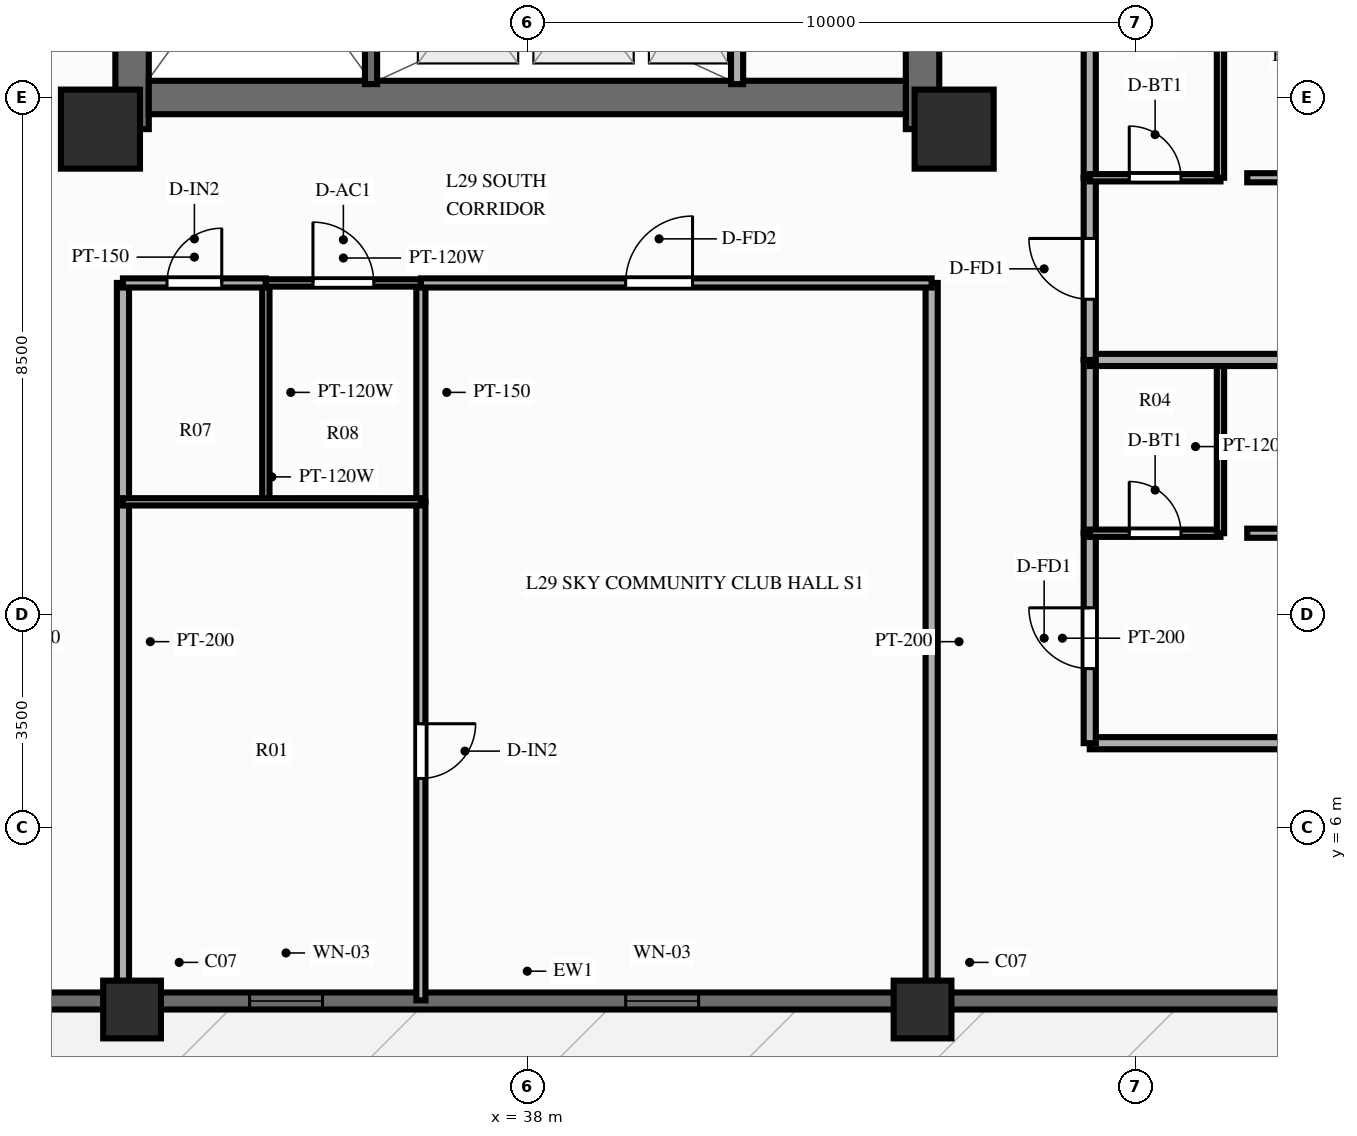
"""IFC4 building model, lengths in metres.
Left out: names, types, materials, properties, quantities, classifications, styles, units other than length and angle.
Written with IfcOpenShell. Run it as: python <this file> out.ifc"""

import sys

from ifc_helpers import new_model, si_unit, direction, frame, frame_2d, origin, origin_2d, place, context, subcontext, project, spatial, rectangle, extrude, source, transform, mapped, element, fill, save


model = new_model("IFC4")
c1 = context("Model", 3, precision=1e-05, world=origin(), true_north=direction((0.0, 1.0)))
c2 = subcontext(c1, "Body", "Model", "MODEL_VIEW")
j1 = project(units=[si_unit("LENGTHUNIT", "METRE"), si_unit("PLANEANGLEUNIT", "RADIAN")], contexts=[c1])
p1 = place(None, origin())
s1 = spatial("IfcSite", under=j1, at=p1, CompositionType="ELEMENT")
p2 = place(p1, origin())
s2 = spatial("IfcBuilding", under=s1, at=p2, CompositionType="ELEMENT")
p3 = place(p2, frame((0.0, 0.0, 92.85)))
s3 = spatial("IfcBuildingStorey", under=s2, at=p3, CompositionType="ELEMENT", Elevation=92.85)
p4 = place(p3, frame((31.5, 17.48, 0.0), z_axis=(0.0, 0.0, 1.0), x_axis=(0.0, 1.0, 0.0)))
e1 = element("IfcWall", 1, at=p4, inside=s3, PredefinedType="SHEAR", context=c2, shape_type="SweptSolid", body=[
    extrude(rectangle(XDim=19.04, YDim=0.55, at=frame_2d((9.52, 0.0))), origin(), (0.0, 0.0, 1.0), 3.0),
])
p5 = place(p4, frame((6.32, 0.0, 0.0)))
e2 = element("IfcOpeningElement", 2, at=p5, cuts=e1, PredefinedType="OPENING", context=c2, shape_type="SweptSolid", body=[
    extrude(rectangle(XDim=1.1, YDim=2.15, at=frame_2d((0.55, 1.075))), frame((0.0, 0.287, 0.0), z_axis=(0.0, -1.0, 0.0), x_axis=(1.0, 0.0, 0.0)), (0.0, 0.0, 1.0), 0.574),
])
p6 = place(p3, frame((44.5, 17.48, 0.0), z_axis=(0.0, 0.0, 1.0), x_axis=(0.0, 1.0, 0.0)))
e3 = element("IfcWall", 3, at=p6, inside=s3, PredefinedType="SHEAR", context=c2, shape_type="SweptSolid", body=[
    extrude(rectangle(XDim=19.04, YDim=0.55, at=frame_2d((9.52, 0.0))), origin(), (0.0, 0.0, 1.0), 3.0),
])
p7 = place(p6, frame((12.67, 0.0, 0.0), z_axis=(0.0, 0.0, 1.0), x_axis=(-1.0, 0.0, 0.0)))
e4 = element("IfcOpeningElement", 4, at=p7, cuts=e3, PredefinedType="OPENING", context=c2, shape_type="SweptSolid", body=[
    extrude(rectangle(XDim=1.1, YDim=2.15, at=frame_2d((0.55, 1.075))), frame((0.0, 0.287, 0.0), z_axis=(0.0, -1.0, 0.0), x_axis=(1.0, 0.0, 0.0)), (0.0, 0.0, 1.0), 0.574),
])
p8 = place(p3, frame((31.775, 18.0, 0.0), z_axis=(0.0, 0.0, 1.0), x_axis=(1.0, 0.0, 0.0)))
e5 = element("IfcWall", 5, at=p8, inside=s3, PredefinedType="SHEAR", context=c2, shape_type="SweptSolid", body=[
    extrude(rectangle(XDim=12.45, YDim=0.55, at=frame_2d((6.225, 0.0))), origin(), (0.0, 0.0, 1.0), 3.0),
])
m1 = source(origin(), c2, "Body", "SweptSolid", [
    extrude(rectangle(XDim=1.3, YDim=1.3, at=origin_2d()), origin(), (0.0, 0.0, 1.0), 3.0),
])
for number, where, z_axis, x_axis in (
    (6, (30.98, 17.48, 0.0), (0.0, 0.0, 1.0), (1.0, 0.0, 0.0)),
    (7, (45.02, 17.48, 0.0), (0.0, 0.0, 1.0), (1.0, 0.0, 0.0)),
):
    element("IfcColumn", number, at=place(p3, frame(where, z_axis=z_axis, x_axis=x_axis)), inside=s3, PredefinedType="COLUMN", context=c2, shape_type="MappedRepresentation", body=[
        mapped(m1, transform((0.0, 0.0, 0.0), scale=1.0)),
    ])
m2 = source(origin(), c2, "Body", "SweptSolid", [
    extrude(rectangle(XDim=0.95, YDim=0.95, at=origin_2d()), origin(), (0.0, 0.0, 1.0), 3.0),
])
for number, where, z_axis, x_axis in (
    (8, (31.5, 3.0, 0.0), (0.0, 0.0, 1.0), (1.0, 0.0, 0.0)),
    (9, (44.5, 3.0, 0.0), (0.0, 0.0, 1.0), (1.0, 0.0, 0.0)),
):
    element("IfcColumn", number, at=place(p3, frame(where, z_axis=z_axis, x_axis=x_axis)), inside=s3, PredefinedType="COLUMN", context=c2, shape_type="MappedRepresentation", body=[
        mapped(m2, transform((0.0, 0.0, 0.0), scale=1.0)),
    ])
p9 = place(p3, frame((16.2, 3.14, 0.0), z_axis=(0.0, 0.0, 1.0), x_axis=(1.0, 0.0, 0.0)))
e10 = element("IfcWall", 10, at=p9, inside=s3, PredefinedType="SOLIDWALL", context=c2, shape_type="SweptSolid", body=[
    extrude(rectangle(XDim=43.6, YDim=0.28, at=frame_2d((21.8, 0.0))), origin(), (0.0, 0.0, 1.0), 2.28),
])
p10 = place(p9, frame((8.2, 0.0, 0.0), z_axis=(0.0, 0.0, 1.0), x_axis=(-1.0, 0.0, 0.0)))
e11 = element("IfcOpeningElement", 11, at=p10, cuts=e10, PredefinedType="OPENING", context=c2, shape_type="SweptSolid", body=[
    extrude(rectangle(XDim=1.1, YDim=2.15, at=frame_2d((0.55, 1.075))), frame((0.0, 0.152, 0.0), z_axis=(0.0, -1.0, 0.0), x_axis=(1.0, 0.0, 0.0)), (0.0, 0.0, 1.0), 0.304),
])
p11 = place(p9, frame((17.232, 0.0, 0.25)))
e12 = element("IfcOpeningElement", 12, at=p11, cuts=e10, PredefinedType="OPENING", context=c2, shape_type="SweptSolid", body=[
    extrude(rectangle(XDim=1.2, YDim=1.5, at=frame_2d((0.6, 0.75))), frame((0.0, 0.152, 0.0), z_axis=(0.0, -1.0, 0.0), x_axis=(1.0, 0.0, 0.0)), (0.0, 0.0, 1.0), 0.304),
])
p12 = place(p9, frame((23.417, 0.0, 0.25)))
e13 = element("IfcOpeningElement", 13, at=p12, cuts=e10, PredefinedType="OPENING", context=c2, shape_type="SweptSolid", body=[
    extrude(rectangle(XDim=1.2, YDim=1.5, at=frame_2d((0.6, 0.75))), frame((0.0, 0.152, 0.0), z_axis=(0.0, -1.0, 0.0), x_axis=(1.0, 0.0, 0.0)), (0.0, 0.0, 1.0), 0.304),
])
p13 = place(p9, frame((35.35, 0.0, 0.25)))
e14 = element("IfcOpeningElement", 14, at=p13, cuts=e10, PredefinedType="OPENING", context=c2, shape_type="SweptSolid", body=[
    extrude(rectangle(XDim=1.2, YDim=1.5, at=frame_2d((0.6, 0.75))), frame((0.0, 0.152, 0.0), z_axis=(0.0, -1.0, 0.0), x_axis=(1.0, 0.0, 0.0)), (0.0, 0.0, 1.0), 0.304),
])
p14 = place(p3, frame((41.45, 18.22, 0.0), z_axis=(0.0, 0.0, 1.0), x_axis=(0.0, 1.0, 0.0)))
e15 = element("IfcWall", 15, at=p14, inside=s3, PredefinedType="PARTITIONING", context=c2, shape_type="SweptSolid", body=[
    extrude(rectangle(XDim=2.96, YDim=0.2, at=frame_2d((1.48, 0.0))), origin(), (0.0, 0.0, 1.0), 2.79),
])
p15 = place(p3, frame((35.43, 18.22, 0.0), z_axis=(0.0, 0.0, 1.0), x_axis=(0.0, 1.0, 0.0)))
e16 = element("IfcWall", 16, at=p15, inside=s3, PredefinedType="SOLIDWALL", context=c2, shape_type="SweptSolid", body=[
    extrude(rectangle(XDim=7.22, YDim=0.2, at=frame_2d((3.61, 0.0))), origin(), (0.0, 0.0, 1.0), 2.79),
])
p16 = place(p15, frame((6.68, 0.0, 0.0), z_axis=(0.0, 0.0, 1.0), x_axis=(-1.0, 0.0, 0.0)))
e17 = element("IfcOpeningElement", 17, at=p16, cuts=e16, PredefinedType="OPENING", context=c2, shape_type="SweptSolid", body=[
    extrude(rectangle(XDim=1.1, YDim=2.15, at=frame_2d((0.55, 1.075))), frame((0.0, 0.112, 0.0), z_axis=(0.0, -1.0, 0.0), x_axis=(1.0, 0.0, 0.0)), (0.0, 0.0, 1.0), 0.224),
])
for number, where, z_axis, x_axis in (
    (18, (31.35, 14.95, 0.0), (0.0, 0.0, 1.0), (0.0, -1.0, 0.0)),
    (19, (44.65, 14.95, 0.0), (0.0, 0.0, 1.0), (0.0, -1.0, 0.0)),
):
    element("IfcWall", number, at=place(p3, frame(where, z_axis=z_axis, x_axis=x_axis)), inside=s3, PredefinedType="PARTITIONING", context=c2, shape_type="SweptSolid", body=[
        extrude(rectangle(XDim=11.8, YDim=0.2, at=frame_2d((5.9, 0.0))), origin(), (0.0, 0.0, 1.0), 2.34),
    ])
p17 = place(p3, frame((33.7, 14.95, 0.0), z_axis=(0.0, 0.0, 1.0), x_axis=(0.0, -1.0, 0.0)))
e20 = element("IfcWall", 20, at=p17, inside=s3, PredefinedType="PARTITIONING", context=c2, shape_type="SweptSolid", body=[
    extrude(rectangle(XDim=3.6, YDim=0.12, at=frame_2d((1.8, 0.0))), origin(), (0.0, 0.0, 1.0), 2.79),
])
p18 = place(p3, frame((36.25, 14.95, 0.0), z_axis=(0.0, 0.0, 1.0), x_axis=(0.0, -1.0, 0.0)))
e21 = element("IfcWall", 21, at=p18, inside=s3, PredefinedType="PARTITIONING", context=c2, shape_type="SweptSolid", body=[
    extrude(rectangle(XDim=3.6, YDim=0.15, at=frame_2d((1.8, 0.0))), origin(), (0.0, 0.0, 1.0), 2.79),
])
p19 = place(p3, frame((36.25, 11.35, 0.0), z_axis=(0.0, 0.0, 1.0), x_axis=(0.0, -1.0, 0.0)))
e22 = element("IfcWall", 22, at=p19, inside=s3, PredefinedType="PARTITIONING", context=c2, shape_type="SweptSolid", body=[
    extrude(rectangle(XDim=8.2, YDim=0.15, at=frame_2d((4.1, 0.0))), origin(), (0.0, 0.0, 1.0), 2.79),
])
p20 = place(p19, frame((3.65, 0.0, 0.0)))
e23 = element("IfcOpeningElement", 23, at=p20, cuts=e22, PredefinedType="OPENING", context=c2, shape_type="SweptSolid", body=[
    extrude(rectangle(XDim=0.9, YDim=2.1, at=frame_2d((0.45, 1.05))), frame((0.0, 0.087, 0.0), z_axis=(0.0, -1.0, 0.0), x_axis=(1.0, 0.0, 0.0)), (0.0, 0.0, 1.0), 0.174),
])
p21 = place(p3, frame((31.35, 11.35, 0.0), z_axis=(0.0, 0.0, 1.0), x_axis=(1.0, 0.0, 0.0)))
e24 = element("IfcWall", 24, at=p21, inside=s3, PredefinedType="PARTITIONING", context=c2, shape_type="SweptSolid", body=[
    extrude(rectangle(XDim=4.9, YDim=0.12, at=frame_2d((2.45, 0.0))), origin(), (0.0, 0.0, 1.0), 2.79),
])
p22 = place(p3, frame((31.35, 14.95, 0.0), z_axis=(0.0, 0.0, 1.0), x_axis=(1.0, 0.0, 0.0)))
e25 = element("IfcWall", 25, at=p22, inside=s3, PredefinedType="PARTITIONING", context=c2, shape_type="SweptSolid", body=[
    extrude(rectangle(XDim=2.35, YDim=0.15, at=frame_2d((1.175, 0.0))), origin(), (0.0, 0.0, 1.0), 2.79),
])
p23 = place(p22, frame((0.725, 0.0, 0.0)))
e26 = element("IfcOpeningElement", 26, at=p23, cuts=e25, PredefinedType="OPENING", context=c2, shape_type="SweptSolid", body=[
    extrude(rectangle(XDim=0.9, YDim=2.1, at=frame_2d((0.45, 1.05))), frame((0.0, 0.087, 0.0), z_axis=(0.0, -1.0, 0.0), x_axis=(1.0, 0.0, 0.0)), (0.0, 0.0, 1.0), 0.174),
])
p24 = place(p3, frame((33.7, 14.95, 0.0), z_axis=(0.0, 0.0, 1.0), x_axis=(1.0, 0.0, 0.0)))
e27 = element("IfcWall", 27, at=p24, inside=s3, PredefinedType="PARTITIONING", context=c2, shape_type="SweptSolid", body=[
    extrude(rectangle(XDim=2.55, YDim=0.12, at=frame_2d((1.275, 0.0))), origin(), (0.0, 0.0, 1.0), 2.79),
])
p25 = place(p24, frame((0.775, 0.0, 0.0)))
e28 = element("IfcOpeningElement", 28, at=p25, cuts=e27, PredefinedType="OPENING", context=c2, shape_type="SweptSolid", body=[
    extrude(rectangle(XDim=1.0, YDim=2.1, at=frame_2d((0.5, 1.05))), frame((0.0, 0.072, 0.0), z_axis=(0.0, -1.0, 0.0), x_axis=(1.0, 0.0, 0.0)), (0.0, 0.0, 1.0), 0.144),
])
p26 = place(p3, frame((36.25, 14.95, 0.0), z_axis=(0.0, 0.0, 1.0), x_axis=(1.0, 0.0, 0.0)))
e29 = element("IfcWall", 29, at=p26, inside=s3, PredefinedType="PARTITIONING", context=c2, shape_type="SweptSolid", body=[
    extrude(rectangle(XDim=8.4, YDim=0.15, at=frame_2d((4.2, 0.0))), origin(), (0.0, 0.0, 1.0), 2.79),
])
p27 = place(p26, frame((3.367, 0.0, 0.0)))
e30 = element("IfcOpeningElement", 30, at=p27, cuts=e29, PredefinedType="OPENING", context=c2, shape_type="SweptSolid", body=[
    extrude(rectangle(XDim=1.1, YDim=2.15, at=frame_2d((0.55, 1.075))), frame((0.0, 0.087, 0.0), z_axis=(0.0, -1.0, 0.0), x_axis=(1.0, 0.0, 0.0)), (0.0, 0.0, 1.0), 0.174),
])
p28 = place(p3, frame((47.25, 7.38, 0.0), z_axis=(0.0, 0.0, 1.0), x_axis=(1.0, 0.0, 0.0)))
e31 = element("IfcWall", 31, at=p28, inside=s3, PredefinedType="PARTITIONING", context=c2, shape_type="SweptSolid", body=[
    extrude(rectangle(XDim=16.6, YDim=0.2, at=frame_2d((8.3, 0.0))), origin(), (0.0, 0.0, 1.0), 2.79),
])
p29 = place(p3, frame((47.25, 7.38, 0.0), z_axis=(0.0, 0.0, 1.0), x_axis=(0.0, 1.0, 0.0)))
e32 = element("IfcWall", 32, at=p29, inside=s3, PredefinedType="PARTITIONING", context=c2, shape_type="SweptSolid", body=[
    extrude(rectangle(XDim=3.454, YDim=0.2, at=frame_2d((1.727, 0.0))), origin(), (0.0, 0.0, 1.0), 2.79),
])
p30 = place(p29, frame((1.227, 0.0, 0.0)))
e33 = element("IfcOpeningElement", 33, at=p30, cuts=e32, PredefinedType="OPENING", context=c2, shape_type="SweptSolid", body=[
    extrude(rectangle(XDim=1.0, YDim=2.15, at=frame_2d((0.5, 1.075))), frame((0.0, 0.112, 0.0), z_axis=(0.0, -1.0, 0.0), x_axis=(1.0, 0.0, 0.0)), (0.0, 0.0, 1.0), 0.224),
])
p31 = place(p3, frame((47.25, 10.833, 0.0), z_axis=(0.0, 0.0, 1.0), x_axis=(0.0, 1.0, 0.0)))
e34 = element("IfcWall", 34, at=p31, inside=s3, PredefinedType="PARTITIONING", context=c2, shape_type="SweptSolid", body=[
    extrude(rectangle(XDim=2.85, YDim=0.2, at=frame_2d((1.425, 0.0))), origin(), (0.0, 0.0, 1.0), 2.79),
])
p32 = place(p3, frame((47.25, 10.833, 0.0), z_axis=(0.0, 0.0, 1.0), x_axis=(1.0, 0.0, 0.0)))
e35 = element("IfcWall", 35, at=p32, inside=s3, PredefinedType="PARTITIONING", context=c2, shape_type="SweptSolid", body=[
    extrude(rectangle(XDim=2.15, YDim=0.12, at=frame_2d((1.075, 0.0))), origin(), (0.0, 0.0, 1.0), 2.79),
])
p33 = place(p32, frame((0.65, 0.0, 0.0)))
e36 = element("IfcOpeningElement", 36, at=p33, cuts=e35, PredefinedType="OPENING", context=c2, shape_type="SweptSolid", body=[
    extrude(rectangle(XDim=0.85, YDim=2.05, at=frame_2d((0.425, 1.025))), frame((0.0, 0.072, 0.0), z_axis=(0.0, -1.0, 0.0), x_axis=(1.0, 0.0, 0.0)), (0.0, 0.0, 1.0), 0.144),
])
p34 = place(p3, frame((49.4, 10.833, 0.0), z_axis=(0.0, 0.0, 1.0), x_axis=(0.0, 1.0, 0.0)))
e37 = element("IfcWall", 37, at=p34, inside=s3, PredefinedType="PARTITIONING", context=c2, shape_type="SweptSolid", body=[
    extrude(rectangle(XDim=2.85, YDim=0.12, at=frame_2d((1.425, 0.0))), origin(), (0.0, 0.0, 1.0), 2.79),
])
p35 = place(p3, frame((49.84, 10.833, 0.0), z_axis=(0.0, 0.0, 1.0), x_axis=(1.0, 0.0, 0.0)))
e38 = element("IfcWall", 38, at=p35, inside=s3, PredefinedType="PARTITIONING", context=c2, shape_type="SweptSolid", body=[
    extrude(rectangle(XDim=3.8, YDim=0.15, at=frame_2d((1.9, 0.0))), origin(), (0.0, 0.0, 1.0), 2.79),
])
p36 = place(p35, frame((1.45, 0.0, 0.0)))
e39 = element("IfcOpeningElement", 39, at=p36, cuts=e38, PredefinedType="OPENING", context=c2, shape_type="SweptSolid", body=[
    extrude(rectangle(XDim=0.9, YDim=2.1, at=frame_2d((0.45, 1.05))), frame((0.0, 0.087, 0.0), z_axis=(0.0, -1.0, 0.0), x_axis=(1.0, 0.0, 0.0)), (0.0, 0.0, 1.0), 0.174),
])
p37 = place(p3, frame((47.25, 13.684, 0.0), z_axis=(0.0, 0.0, 1.0), x_axis=(1.0, 0.0, 0.0)))
e40 = element("IfcWall", 40, at=p37, inside=s3, PredefinedType="PARTITIONING", context=c2, shape_type="SweptSolid", body=[
    extrude(rectangle(XDim=16.6, YDim=0.2, at=frame_2d((8.3, 0.0))), origin(), (0.0, 0.0, 1.0), 2.79),
])
p38 = place(p3, frame((47.25, 13.684, 0.0), z_axis=(0.0, 0.0, 1.0), x_axis=(0.0, 1.0, 0.0)))
e41 = element("IfcWall", 41, at=p38, inside=s3, PredefinedType="PARTITIONING", context=c2, shape_type="SweptSolid", body=[
    extrude(rectangle(XDim=2.996, YDim=0.2, at=frame_2d((1.498, 0.0))), origin(), (0.0, 0.0, 1.0), 2.79),
])
p39 = place(p38, frame((0.998, 0.0, 0.0)))
e42 = element("IfcOpeningElement", 42, at=p39, cuts=e41, PredefinedType="OPENING", context=c2, shape_type="SweptSolid", body=[
    extrude(rectangle(XDim=1.0, YDim=2.15, at=frame_2d((0.5, 1.075))), frame((0.0, 0.112, 0.0), z_axis=(0.0, -1.0, 0.0), x_axis=(1.0, 0.0, 0.0)), (0.0, 0.0, 1.0), 0.224),
])
p40 = place(p3, frame((47.25, 16.68, 0.0), z_axis=(0.0, 0.0, 1.0), x_axis=(0.0, 1.0, 0.0)))
e43 = element("IfcWall", 43, at=p40, inside=s3, PredefinedType="PARTITIONING", context=c2, shape_type="SweptSolid", body=[
    extrude(rectangle(XDim=3.122, YDim=0.2, at=frame_2d((1.561, 0.0))), origin(), (0.0, 0.0, 1.0), 2.79),
])
p41 = place(p3, frame((47.25, 16.68, 0.0), z_axis=(0.0, 0.0, 1.0), x_axis=(1.0, 0.0, 0.0)))
e44 = element("IfcWall", 44, at=p41, inside=s3, PredefinedType="PARTITIONING", context=c2, shape_type="SweptSolid", body=[
    extrude(rectangle(XDim=2.15, YDim=0.12, at=frame_2d((1.075, 0.0))), origin(), (0.0, 0.0, 1.0), 2.79),
])
p42 = place(p41, frame((0.65, 0.0, 0.0)))
e45 = element("IfcOpeningElement", 45, at=p42, cuts=e44, PredefinedType="OPENING", context=c2, shape_type="SweptSolid", body=[
    extrude(rectangle(XDim=0.85, YDim=2.05, at=frame_2d((0.425, 1.025))), frame((0.0, 0.072, 0.0), z_axis=(0.0, -1.0, 0.0), x_axis=(1.0, 0.0, 0.0)), (0.0, 0.0, 1.0), 0.144),
])
p43 = place(p3, frame((49.4, 16.68, 0.0), z_axis=(0.0, 0.0, 1.0), x_axis=(0.0, 1.0, 0.0)))
e46 = element("IfcWall", 46, at=p43, inside=s3, PredefinedType="PARTITIONING", context=c2, shape_type="SweptSolid", body=[
    extrude(rectangle(XDim=3.122, YDim=0.12, at=frame_2d((1.561, 0.0))), origin(), (0.0, 0.0, 1.0), 2.79),
])
p44 = place(p3, frame((49.84, 16.68, 0.0), z_axis=(0.0, 0.0, 1.0), x_axis=(1.0, 0.0, 0.0)))
e47 = element("IfcWall", 47, at=p44, inside=s3, PredefinedType="PARTITIONING", context=c2, shape_type="SweptSolid", body=[
    extrude(rectangle(XDim=3.8, YDim=0.15, at=frame_2d((1.9, 0.0))), origin(), (0.0, 0.0, 1.0), 2.79),
])
p45 = place(p44, frame((1.45, 0.0, 0.0)))
e48 = element("IfcOpeningElement", 48, at=p45, cuts=e47, PredefinedType="OPENING", context=c2, shape_type="SweptSolid", body=[
    extrude(rectangle(XDim=0.9, YDim=2.1, at=frame_2d((0.45, 1.05))), frame((0.0, 0.087, 0.0), z_axis=(0.0, -1.0, 0.0), x_axis=(1.0, 0.0, 0.0)), (0.0, 0.0, 1.0), 0.174),
])
m3 = source(origin(), c2, "Body", "SweptSolid", [
    extrude(rectangle(XDim=1.2, YDim=1.5, at=frame_2d((0.6, 0.75))), frame((0.0, 0.03, 0.0), z_axis=(0.0, -1.0, 0.0), x_axis=(1.0, 0.0, 0.0)), (0.0, 0.0, 1.0), 0.06),
])
p46 = place(p11, origin())
e49 = element("IfcWindow", 49, at=p46, inside=s3, PartitioningType="SINGLE_PANEL", PredefinedType="WINDOW", context=c2, shape_type="MappedRepresentation", body=[
    mapped(m3, transform((0.0, 0.0, 0.0), scale=1.0)),
])
fill(e12, e49)
p47 = place(p12, origin())
e50 = element("IfcWindow", 50, at=p47, inside=s3, PartitioningType="SINGLE_PANEL", PredefinedType="WINDOW", context=c2, shape_type="MappedRepresentation", body=[
    mapped(m3, transform((0.0, 0.0, 0.0), scale=1.0)),
])
fill(e13, e50)
m4 = source(origin(), c2, "Body", "SweptSolid", [
    extrude(rectangle(XDim=0.9, YDim=2.1, at=frame_2d((0.45, 1.05))), frame((0.0, 0.025, 0.0), z_axis=(0.0, -1.0, 0.0), x_axis=(1.0, 0.0, 0.0)), (0.0, 0.0, 1.0), 0.05),
])
p48 = place(p20, origin())
e51 = element("IfcDoor", 51, at=p48, inside=s3, OperationType="SINGLE_SWING_LEFT", PredefinedType="DOOR", context=c2, shape_type="MappedRepresentation", body=[
    mapped(m4, transform((0.0, 0.0, 0.0), scale=1.0)),
])
fill(e23, e51)
p49 = place(p23, origin())
e52 = element("IfcDoor", 52, at=p49, inside=s3, OperationType="SINGLE_SWING_RIGHT", PredefinedType="DOOR", context=c2, shape_type="MappedRepresentation", body=[
    mapped(m4, transform((0.0, 0.0, 0.0), scale=1.0)),
])
fill(e26, e52)
m5 = source(origin(), c2, "Body", "SweptSolid", [
    extrude(rectangle(XDim=1.0, YDim=2.1, at=frame_2d((0.5, 1.05))), frame((0.0, 0.025, 0.0), z_axis=(0.0, -1.0, 0.0), x_axis=(1.0, 0.0, 0.0)), (0.0, 0.0, 1.0), 0.05),
])
p50 = place(p25, origin())
e53 = element("IfcDoor", 53, at=p50, inside=s3, OperationType="SINGLE_SWING_LEFT", PredefinedType="DOOR", context=c2, shape_type="MappedRepresentation", body=[
    mapped(m5, transform((0.0, 0.0, 0.0), scale=1.0)),
])
fill(e28, e53)
m6 = source(origin(), c2, "Body", "SweptSolid", [
    extrude(rectangle(XDim=1.1, YDim=2.15, at=frame_2d((0.55, 1.075))), frame((0.0, 0.025, 0.0), z_axis=(0.0, -1.0, 0.0), x_axis=(1.0, 0.0, 0.0)), (0.0, 0.0, 1.0), 0.05),
])
p51 = place(p27, origin())
e54 = element("IfcDoor", 54, at=p51, inside=s3, OperationType="SINGLE_SWING_RIGHT", PredefinedType="DOOR", context=c2, shape_type="MappedRepresentation", body=[
    mapped(m6, transform((0.0, 0.0, 0.0), scale=1.0)),
])
fill(e30, e54)
m7 = source(origin(), c2, "Body", "SweptSolid", [
    extrude(rectangle(XDim=1.0, YDim=2.15, at=frame_2d((0.5, 1.075))), frame((0.0, 0.025, 0.0), z_axis=(0.0, -1.0, 0.0), x_axis=(1.0, 0.0, 0.0)), (0.0, 0.0, 1.0), 0.05),
])
p52 = place(p30, origin())
e55 = element("IfcDoor", 55, at=p52, inside=s3, OperationType="SINGLE_SWING_RIGHT", PredefinedType="DOOR", context=c2, shape_type="MappedRepresentation", body=[
    mapped(m7, transform((0.0, 0.0, 0.0), scale=1.0)),
])
fill(e33, e55)
m8 = source(origin(), c2, "Body", "SweptSolid", [
    extrude(rectangle(XDim=0.85, YDim=2.05, at=frame_2d((0.425, 1.025))), frame((0.0, 0.025, 0.0), z_axis=(0.0, -1.0, 0.0), x_axis=(1.0, 0.0, 0.0)), (0.0, 0.0, 1.0), 0.05),
])
p53 = place(p33, origin())
e56 = element("IfcDoor", 56, at=p53, inside=s3, OperationType="SINGLE_SWING_LEFT", PredefinedType="DOOR", context=c2, shape_type="MappedRepresentation", body=[
    mapped(m8, transform((0.0, 0.0, 0.0), scale=1.0)),
])
fill(e36, e56)
p54 = place(p39, origin())
e57 = element("IfcDoor", 57, at=p54, inside=s3, OperationType="SINGLE_SWING_RIGHT", PredefinedType="DOOR", context=c2, shape_type="MappedRepresentation", body=[
    mapped(m7, transform((0.0, 0.0, 0.0), scale=1.0)),
])
fill(e42, e57)
p55 = place(p42, origin())
e58 = element("IfcDoor", 58, at=p55, inside=s3, OperationType="SINGLE_SWING_LEFT", PredefinedType="DOOR", context=c2, shape_type="MappedRepresentation", body=[
    mapped(m8, transform((0.0, 0.0, 0.0), scale=1.0)),
])
fill(e45, e58)
save(model, sys.argv[1])
